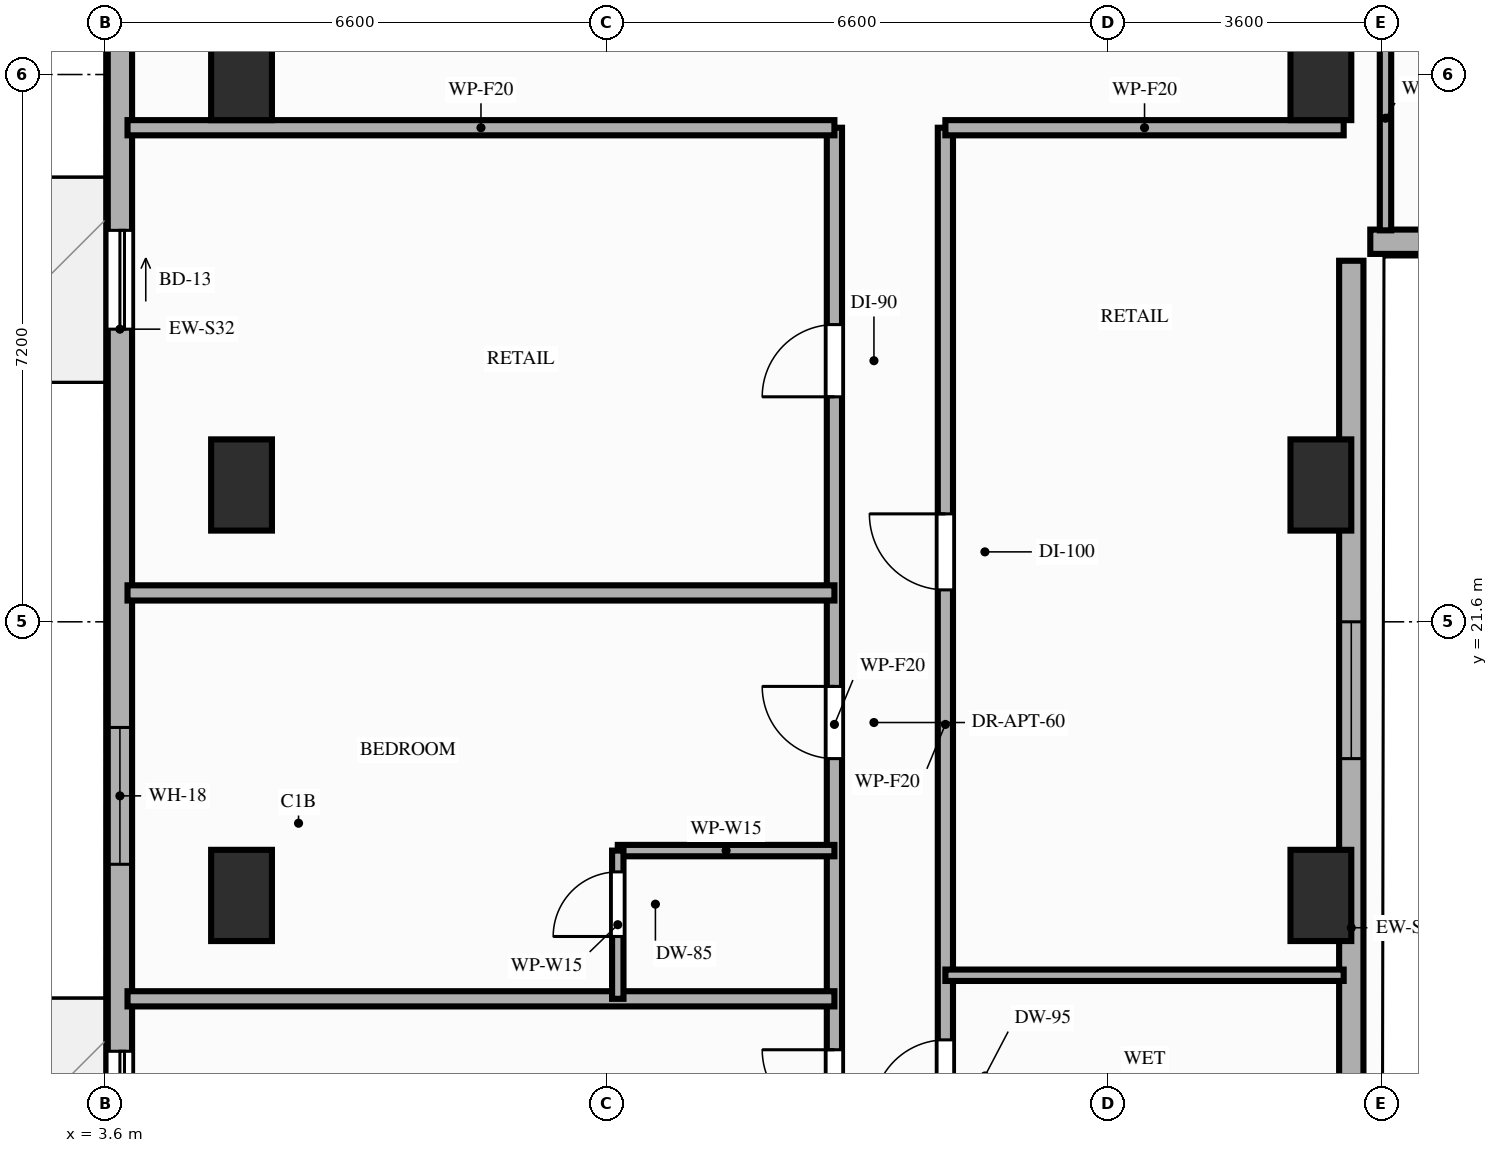
"""IFC4 building model, lengths in metres.
Left out: names, types, materials, properties, quantities, classifications, styles, units other than length and angle.
Written with IfcOpenShell. Run it as: python <this file> out.ifc"""

import sys

from ifc_helpers import new_model, si_unit, direction, frame, frame_2d, origin, origin_2d, place, context, subcontext, project, spatial, rectangle, extrude, element, fill, save


model = new_model("IFC4")
c1 = context("Model", 3, precision=1e-05, world=origin(), true_north=direction((0.0, 1.0)))
c2 = subcontext(c1, "Body", "Model", "MODEL_VIEW")
j1 = project(units=[si_unit("LENGTHUNIT", "METRE"), si_unit("PLANEANGLEUNIT", "RADIAN")], contexts=[c1])
p1 = place(None, origin())
s1 = spatial("IfcSite", under=j1, at=p1, CompositionType="ELEMENT")
p2 = place(p1, origin())
s2 = spatial("IfcBuilding", under=s1, at=p2, CompositionType="ELEMENT")
p3 = place(p2, frame((0.0, 0.0, 96.2)))
s3 = spatial("IfcBuildingStorey", under=s2, at=p3, CompositionType="ELEMENT", Elevation=96.2)
for number, where, z_axis, x_axis in (
    (1, (5.4, 18.0, 0.0), (0.0, 0.0, 1.0), (1.0, 0.0, 0.0)),
    (2, (19.6, 18.0, 0.0), (0.0, 0.0, 1.0), (1.0, 0.0, 0.0)),
    (3, (5.4, 23.4, 0.0), (0.0, 0.0, 1.0), (1.0, 0.0, 0.0)),
    (4, (19.6, 23.4, 0.0), (0.0, 0.0, 1.0), (1.0, 0.0, 0.0)),
    (5, (5.4, 28.8, 0.0), (0.0, 0.0, 1.0), (1.0, 0.0, 0.0)),
    (6, (19.6, 28.8, 0.0), (0.0, 0.0, 1.0), (1.0, 0.0, 0.0)),
):
    element("IfcColumn", number, at=place(p3, frame(where, z_axis=z_axis, x_axis=x_axis)), inside=s3, PredefinedType="COLUMN", context=c2, shape_type="SweptSolid", body=[
        extrude(rectangle(XDim=0.8, YDim=1.2, at=origin_2d()), origin(), (0.0, 0.0, 1.0), 3.2),
    ])
p4 = place(p3, frame((3.8, 42.1, 0.0), z_axis=(0.0, 0.0, 1.0), x_axis=(0.0, -1.0, 0.0)))
e7 = element("IfcWall", 7, at=p4, inside=s3, PredefinedType="STANDARD", context=c2, shape_type="SweptSolid", body=[
    extrude(rectangle(XDim=33.3, YDim=0.32, at=frame_2d((16.65, 0.0))), origin(), (0.0, 0.0, 1.0), 2.71),
])
p5 = place(p4, frame((26.15, 0.0, 0.0)))
e8 = element("IfcOpeningElement", 8, at=p5, cuts=e7, PredefinedType="OPENING", context=c2, shape_type="SweptSolid", body=[
    extrude(rectangle(XDim=1.3, YDim=2.08, at=frame_2d((0.65, 1.04))), frame((0.0, 0.17, 0.0), z_axis=(0.0, -1.0, 0.0), x_axis=(1.0, 0.0, 0.0)), (0.0, 0.0, 1.0), 0.34),
])
p6 = place(p4, frame((15.35, 0.0, 0.0)))
e9 = element("IfcOpeningElement", 9, at=p6, cuts=e7, PredefinedType="OPENING", context=c2, shape_type="SweptSolid", body=[
    extrude(rectangle(XDim=1.3, YDim=2.08, at=frame_2d((0.65, 1.04))), frame((0.0, 0.17, 0.0), z_axis=(0.0, -1.0, 0.0), x_axis=(1.0, 0.0, 0.0)), (0.0, 0.0, 1.0), 0.34),
])
p7 = place(p4, frame((21.89, 0.0, 0.85)))
e10 = element("IfcOpeningElement", 10, at=p7, cuts=e7, PredefinedType="OPENING", context=c2, shape_type="SweptSolid", body=[
    extrude(rectangle(XDim=1.8, YDim=1.61, at=frame_2d((0.9, 0.805))), frame((0.0, 0.17, 0.0), z_axis=(0.0, -1.0, 0.0), x_axis=(1.0, 0.0, 0.0)), (0.0, 0.0, 1.0), 0.34),
])
p8 = place(p4, frame((30.8, 0.0, 0.85)))
e11 = element("IfcOpeningElement", 11, at=p8, cuts=e7, PredefinedType="OPENING", context=c2, shape_type="SweptSolid", body=[
    extrude(rectangle(XDim=1.8, YDim=1.61, at=frame_2d((0.9, 0.805))), frame((0.0, 0.17, 0.0), z_axis=(0.0, -1.0, 0.0), x_axis=(1.0, 0.0, 0.0)), (0.0, 0.0, 1.0), 0.34),
])
p9 = place(p4, frame((9.9, 0.0, 0.85)))
e12 = element("IfcOpeningElement", 12, at=p9, cuts=e7, PredefinedType="OPENING", context=c2, shape_type="SweptSolid", body=[
    extrude(rectangle(XDim=1.8, YDim=1.61, at=frame_2d((0.9, 0.805))), frame((0.0, 0.17, 0.0), z_axis=(0.0, -1.0, 0.0), x_axis=(1.0, 0.0, 0.0)), (0.0, 0.0, 1.0), 0.34),
])
p10 = place(p4, frame((3.8, 0.0, 0.85)))
e13 = element("IfcOpeningElement", 13, at=p10, cuts=e7, PredefinedType="OPENING", context=c2, shape_type="SweptSolid", body=[
    extrude(rectangle(XDim=1.8, YDim=1.61, at=frame_2d((0.9, 0.805))), frame((0.0, 0.17, 0.0), z_axis=(0.0, -1.0, 0.0), x_axis=(1.0, 0.0, 0.0)), (0.0, 0.0, 1.0), 0.34),
])
p11 = place(p3, frame((20.0, 8.8, 0.0), z_axis=(0.0, 0.0, 1.0), x_axis=(0.0, 1.0, 0.0)))
e14 = element("IfcWall", 14, at=p11, inside=s3, PredefinedType="STANDARD", context=c2, shape_type="SweptSolid", body=[
    extrude(rectangle(XDim=17.55, YDim=0.32, at=frame_2d((8.775, 0.0))), origin(), (0.0, 0.0, 1.0), 2.41),
])
p12 = place(p11, frame((11.0, 0.0, 0.85)))
e15 = element("IfcOpeningElement", 15, at=p12, cuts=e14, PredefinedType="OPENING", context=c2, shape_type="SweptSolid", body=[
    extrude(rectangle(XDim=1.8, YDim=1.31, at=frame_2d((0.9, 0.655))), frame((0.0, 0.17, 0.0), z_axis=(0.0, -1.0, 0.0), x_axis=(1.0, 0.0, 0.0)), (0.0, 0.0, 1.0), 0.34),
])
p13 = place(p3, frame((20.25, 26.6, 0.0), z_axis=(0.0, 0.0, 1.0), x_axis=(1.0, 0.0, 0.0)))
e16 = element("IfcWall", 16, at=p13, inside=s3, PredefinedType="STANDARD", context=c2, shape_type="SweptSolid", body=[
    extrude(rectangle(XDim=26.15, YDim=0.32, at=frame_2d((13.075, 0.0))), origin(), (0.0, 0.0, 1.0), 2.71),
])
p14 = place(p13, frame((13.9, 0.0, 0.0)))
e17 = element("IfcOpeningElement", 17, at=p14, cuts=e16, PredefinedType="OPENING", context=c2, shape_type="SweptSolid", body=[
    extrude(rectangle(XDim=1.3, YDim=2.08, at=frame_2d((0.65, 1.04))), frame((0.0, 0.17, 0.0), z_axis=(0.0, -1.0, 0.0), x_axis=(1.0, 0.0, 0.0)), (0.0, 0.0, 1.0), 0.34),
])
p15 = place(p13, frame((2.25, 0.0, 0.85)))
e18 = element("IfcOpeningElement", 18, at=p15, cuts=e16, PredefinedType="OPENING", context=c2, shape_type="SweptSolid", body=[
    extrude(rectangle(XDim=1.8, YDim=1.61, at=frame_2d((0.9, 0.805))), frame((0.0, 0.17, 0.0), z_axis=(0.0, -1.0, 0.0), x_axis=(1.0, 0.0, 0.0)), (0.0, 0.0, 1.0), 0.34),
])
p16 = place(p13, frame((7.75, 0.0, 0.85)))
e19 = element("IfcOpeningElement", 19, at=p16, cuts=e16, PredefinedType="OPENING", context=c2, shape_type="SweptSolid", body=[
    extrude(rectangle(XDim=1.8, YDim=1.61, at=frame_2d((0.9, 0.805))), frame((0.0, 0.17, 0.0), z_axis=(0.0, -1.0, 0.0), x_axis=(1.0, 0.0, 0.0)), (0.0, 0.0, 1.0), 0.34),
])
p17 = place(p13, frame((22.25, 0.0, 0.85)))
e20 = element("IfcOpeningElement", 20, at=p17, cuts=e16, PredefinedType="OPENING", context=c2, shape_type="SweptSolid", body=[
    extrude(rectangle(XDim=1.8, YDim=1.61, at=frame_2d((0.9, 0.805))), frame((0.0, 0.17, 0.0), z_axis=(0.0, -1.0, 0.0), x_axis=(1.0, 0.0, 0.0)), (0.0, 0.0, 1.0), 0.34),
])
p18 = place(p3, frame((13.2, 12.4, 0.0), z_axis=(0.0, 0.0, 1.0), x_axis=(0.0, 1.0, 0.0)))
e21 = element("IfcWall", 21, at=p18, inside=s3, PredefinedType="PARTITIONING", context=c2, shape_type="SweptSolid", body=[
    extrude(rectangle(XDim=15.7, YDim=0.2, at=frame_2d((7.85, 0.0))), origin(), (0.0, 0.0, 1.0), 2.41),
])
p19 = place(p18, frame((2.62, 0.0, 0.0)))
e22 = element("IfcOpeningElement", 22, at=p19, cuts=e21, PredefinedType="OPENING", context=c2, shape_type="SweptSolid", body=[
    extrude(rectangle(XDim=0.95, YDim=2.15, at=frame_2d((0.475, 1.075))), frame((0.0, 0.11, 0.0), z_axis=(0.0, -1.0, 0.0), x_axis=(1.0, 0.0, 0.0)), (0.0, 0.0, 1.0), 0.22),
])
p20 = place(p18, frame((7.4, 0.0, 0.0)))
e23 = element("IfcOpeningElement", 23, at=p20, cuts=e21, PredefinedType="OPENING", context=c2, shape_type="SweptSolid", body=[
    extrude(rectangle(XDim=0.95, YDim=2.15, at=frame_2d((0.475, 1.075))), frame((0.0, 0.11, 0.0), z_axis=(0.0, -1.0, 0.0), x_axis=(1.0, 0.0, 0.0)), (0.0, 0.0, 1.0), 0.22),
])
p21 = place(p18, frame((12.16, 0.0, 0.0)))
e24 = element("IfcOpeningElement", 24, at=p21, cuts=e21, PredefinedType="OPENING", context=c2, shape_type="SweptSolid", body=[
    extrude(rectangle(XDim=0.95, YDim=2.15, at=frame_2d((0.475, 1.075))), frame((0.0, 0.11, 0.0), z_axis=(0.0, -1.0, 0.0), x_axis=(1.0, 0.0, 0.0)), (0.0, 0.0, 1.0), 0.22),
])
p22 = place(p3, frame((14.66, 12.4, 0.0), z_axis=(0.0, 0.0, 1.0), x_axis=(0.0, 1.0, 0.0)))
e25 = element("IfcWall", 25, at=p22, inside=s3, PredefinedType="PARTITIONING", context=c2, shape_type="SweptSolid", body=[
    extrude(rectangle(XDim=15.7, YDim=0.2, at=frame_2d((7.85, 0.0))), origin(), (0.0, 0.0, 1.0), 2.41),
])
p23 = place(p22, frame((0.45, 0.0, 0.0)))
e26 = element("IfcOpeningElement", 26, at=p23, cuts=e25, PredefinedType="OPENING", context=c2, shape_type="SweptSolid", body=[
    extrude(rectangle(XDim=0.95, YDim=2.15, at=frame_2d((0.475, 1.075))), frame((0.0, 0.11, 0.0), z_axis=(0.0, -1.0, 0.0), x_axis=(1.0, 0.0, 0.0)), (0.0, 0.0, 1.0), 0.22),
])
p24 = place(p22, frame((2.75, 0.0, 0.0)))
e27 = element("IfcOpeningElement", 27, at=p24, cuts=e25, PredefinedType="OPENING", context=c2, shape_type="SweptSolid", body=[
    extrude(rectangle(XDim=0.95, YDim=2.1, at=frame_2d((0.475, 1.05))), frame((0.0, 0.11, 0.0), z_axis=(0.0, -1.0, 0.0), x_axis=(1.0, 0.0, 0.0)), (0.0, 0.0, 1.0), 0.22),
])
p25 = place(p22, frame((9.62, 0.0, 0.0)))
e28 = element("IfcOpeningElement", 28, at=p25, cuts=e25, PredefinedType="OPENING", context=c2, shape_type="SweptSolid", body=[
    extrude(rectangle(XDim=1.0, YDim=2.15, at=frame_2d((0.5, 1.075))), frame((0.0, 0.11, 0.0), z_axis=(0.0, -1.0, 0.0), x_axis=(1.0, 0.0, 0.0)), (0.0, 0.0, 1.0), 0.22),
])
p26 = place(p3, frame((3.9, 28.1, 0.0), z_axis=(0.0, 0.0, 1.0), x_axis=(1.0, 0.0, 0.0)))
e29 = element("IfcWall", 29, at=p26, inside=s3, PredefinedType="PARTITIONING", context=c2, shape_type="SweptSolid", body=[
    extrude(rectangle(XDim=9.3, YDim=0.2, at=frame_2d((4.65, 0.0))), origin(), (0.0, 0.0, 1.0), 2.41),
])
p27 = place(p3, frame((14.66, 28.1, 0.0), z_axis=(0.0, 0.0, 1.0), x_axis=(1.0, 0.0, 0.0)))
e30 = element("IfcWall", 30, at=p27, inside=s3, PredefinedType="PARTITIONING", context=c2, shape_type="SweptSolid", body=[
    extrude(rectangle(XDim=5.24, YDim=0.2, at=frame_2d((2.62, 0.0))), origin(), (0.0, 0.0, 1.0), 2.41),
])
p28 = place(p3, frame((20.45, 26.75, 0.0), z_axis=(0.0, 0.0, 1.0), x_axis=(0.0, 1.0, 0.0)))
e31 = element("IfcWall", 31, at=p28, inside=s3, PredefinedType="PARTITIONING", context=c2, shape_type="SweptSolid", body=[
    extrude(rectangle(XDim=2.95, YDim=0.15, at=frame_2d((1.475, 0.0))), origin(), (0.0, 0.0, 1.0), 2.41),
])
p29 = place(p3, frame((3.9, 16.64, 0.0), z_axis=(0.0, 0.0, 1.0), x_axis=(1.0, 0.0, 0.0)))
e32 = element("IfcWall", 32, at=p29, inside=s3, PredefinedType="PARTITIONING", context=c2, shape_type="SweptSolid", body=[
    extrude(rectangle(XDim=9.3, YDim=0.2, at=frame_2d((4.65, 0.0))), origin(), (0.0, 0.0, 1.0), 2.41),
])
p30 = place(p3, frame((10.35, 18.59, 0.0), z_axis=(0.0, 0.0, 1.0), x_axis=(1.0, 0.0, 0.0)))
e33 = element("IfcWall", 33, at=p30, inside=s3, PredefinedType="PARTITIONING", context=c2, shape_type="SweptSolid", body=[
    extrude(rectangle(XDim=2.85, YDim=0.15, at=frame_2d((1.425, 0.0))), origin(), (0.0, 0.0, 1.0), 3.02),
])
p31 = place(p3, frame((10.35, 16.64, 0.0), z_axis=(0.0, 0.0, 1.0), x_axis=(0.0, 1.0, 0.0)))
e34 = element("IfcWall", 34, at=p31, inside=s3, PredefinedType="PARTITIONING", context=c2, shape_type="SweptSolid", body=[
    extrude(rectangle(XDim=1.95, YDim=0.15, at=frame_2d((0.975, 0.0))), origin(), (0.0, 0.0, 1.0), 2.41),
])
p32 = place(p31, frame((0.82, 0.0, 0.0)))
e35 = element("IfcOpeningElement", 35, at=p32, cuts=e34, PredefinedType="OPENING", context=c2, shape_type="SweptSolid", body=[
    extrude(rectangle(XDim=0.85, YDim=2.1, at=frame_2d((0.425, 1.05))), frame((0.0, 0.085, 0.0), z_axis=(0.0, -1.0, 0.0), x_axis=(1.0, 0.0, 0.0)), (0.0, 0.0, 1.0), 0.17),
])
p33 = place(p3, frame((3.9, 21.98, 0.0), z_axis=(0.0, 0.0, 1.0), x_axis=(1.0, 0.0, 0.0)))
e36 = element("IfcWall", 36, at=p33, inside=s3, PredefinedType="PARTITIONING", context=c2, shape_type="SweptSolid", body=[
    extrude(rectangle(XDim=9.3, YDim=0.2, at=frame_2d((4.65, 0.0))), origin(), (0.0, 0.0, 1.0), 2.41),
])
p34 = place(p3, frame((14.66, 16.95, 0.0), z_axis=(0.0, 0.0, 1.0), x_axis=(1.0, 0.0, 0.0)))
e37 = element("IfcWall", 37, at=p34, inside=s3, PredefinedType="PARTITIONING", context=c2, shape_type="SweptSolid", body=[
    extrude(rectangle(XDim=5.24, YDim=0.15, at=frame_2d((2.62, 0.0))), origin(), (0.0, 0.0, 1.0), 2.41),
])
p35 = place(p5, origin())
e38 = element("IfcDoor", 38, at=p35, inside=s3, OperationType="SLIDING_TO_LEFT", PredefinedType="DOOR", context=c2, shape_type="SweptSolid", body=[
    extrude(rectangle(XDim=1.3, YDim=2.08, at=frame_2d((0.65, 1.04))), frame((0.0, 0.025, 0.0), z_axis=(0.0, -1.0, 0.0), x_axis=(1.0, 0.0, 0.0)), (0.0, 0.0, 1.0), 0.05),
])
fill(e8, e38)
p36 = place(p6, origin())
e39 = element("IfcDoor", 39, at=p36, inside=s3, OperationType="SLIDING_TO_LEFT", PredefinedType="DOOR", context=c2, shape_type="SweptSolid", body=[
    extrude(rectangle(XDim=1.3, YDim=2.08, at=frame_2d((0.65, 1.04))), frame((0.0, 0.025, 0.0), z_axis=(0.0, -1.0, 0.0), x_axis=(1.0, 0.0, 0.0)), (0.0, 0.0, 1.0), 0.05),
])
fill(e9, e39)
p37 = place(p7, origin())
e40 = element("IfcWindow", 40, at=p37, inside=s3, PartitioningType="SINGLE_PANEL", PredefinedType="WINDOW", context=c2, shape_type="SweptSolid", body=[
    extrude(rectangle(XDim=1.8, YDim=1.61, at=frame_2d((0.9, 0.805))), frame((0.0, 0.03, 0.0), z_axis=(0.0, -1.0, 0.0), x_axis=(1.0, 0.0, 0.0)), (0.0, 0.0, 1.0), 0.06),
])
fill(e10, e40)
p38 = place(p12, origin())
e41 = element("IfcWindow", 41, at=p38, inside=s3, PartitioningType="SINGLE_PANEL", PredefinedType="WINDOW", context=c2, shape_type="SweptSolid", body=[
    extrude(rectangle(XDim=1.8, YDim=1.31, at=frame_2d((0.9, 0.655))), frame((0.0, 0.03, 0.0), z_axis=(0.0, -1.0, 0.0), x_axis=(1.0, 0.0, 0.0)), (0.0, 0.0, 1.0), 0.06),
])
fill(e15, e41)
p39 = place(p19, origin())
e42 = element("IfcDoor", 42, at=p39, inside=s3, OperationType="SINGLE_SWING_RIGHT", PredefinedType="DOOR", context=c2, shape_type="SweptSolid", body=[
    extrude(rectangle(XDim=0.95, YDim=2.15, at=frame_2d((0.475, 1.075))), frame((0.0, 0.025, 0.0), z_axis=(0.0, -1.0, 0.0), x_axis=(1.0, 0.0, 0.0)), (0.0, 0.0, 1.0), 0.05),
])
fill(e22, e42)
p40 = place(p32, origin())
e43 = element("IfcDoor", 43, at=p40, inside=s3, OperationType="SINGLE_SWING_LEFT", PredefinedType="DOOR", context=c2, shape_type="SweptSolid", body=[
    extrude(rectangle(XDim=0.85, YDim=2.1, at=frame_2d((0.425, 1.05))), frame((0.0, 0.025, 0.0), z_axis=(0.0, -1.0, 0.0), x_axis=(1.0, 0.0, 0.0)), (0.0, 0.0, 1.0), 0.05),
])
fill(e35, e43)
p41 = place(p20, origin())
e44 = element("IfcDoor", 44, at=p41, inside=s3, OperationType="SINGLE_SWING_RIGHT", PredefinedType="DOOR", context=c2, shape_type="SweptSolid", body=[
    extrude(rectangle(XDim=0.95, YDim=2.15, at=frame_2d((0.475, 1.075))), frame((0.0, 0.025, 0.0), z_axis=(0.0, -1.0, 0.0), x_axis=(1.0, 0.0, 0.0)), (0.0, 0.0, 1.0), 0.05),
])
fill(e23, e44)
p42 = place(p21, origin())
e45 = element("IfcDoor", 45, at=p42, inside=s3, OperationType="SINGLE_SWING_LEFT", PredefinedType="DOOR", context=c2, shape_type="SweptSolid", body=[
    extrude(rectangle(XDim=0.95, YDim=2.15, at=frame_2d((0.475, 1.075))), frame((0.0, 0.025, 0.0), z_axis=(0.0, -1.0, 0.0), x_axis=(1.0, 0.0, 0.0)), (0.0, 0.0, 1.0), 0.05),
])
fill(e24, e45)
p43 = place(p24, origin())
e46 = element("IfcDoor", 46, at=p43, inside=s3, OperationType="SINGLE_SWING_LEFT", PredefinedType="DOOR", context=c2, shape_type="SweptSolid", body=[
    extrude(rectangle(XDim=0.95, YDim=2.1, at=frame_2d((0.475, 1.05))), frame((0.0, 0.025, 0.0), z_axis=(0.0, -1.0, 0.0), x_axis=(1.0, 0.0, 0.0)), (0.0, 0.0, 1.0), 0.05),
])
fill(e27, e46)
p44 = place(p25, origin())
e47 = element("IfcDoor", 47, at=p44, inside=s3, OperationType="SINGLE_SWING_RIGHT", PredefinedType="DOOR", context=c2, shape_type="SweptSolid", body=[
    extrude(rectangle(XDim=1.0, YDim=2.15, at=frame_2d((0.5, 1.075))), frame((0.0, 0.025, 0.0), z_axis=(0.0, -1.0, 0.0), x_axis=(1.0, 0.0, 0.0)), (0.0, 0.0, 1.0), 0.05),
])
fill(e28, e47)
save(model, sys.argv[1])
